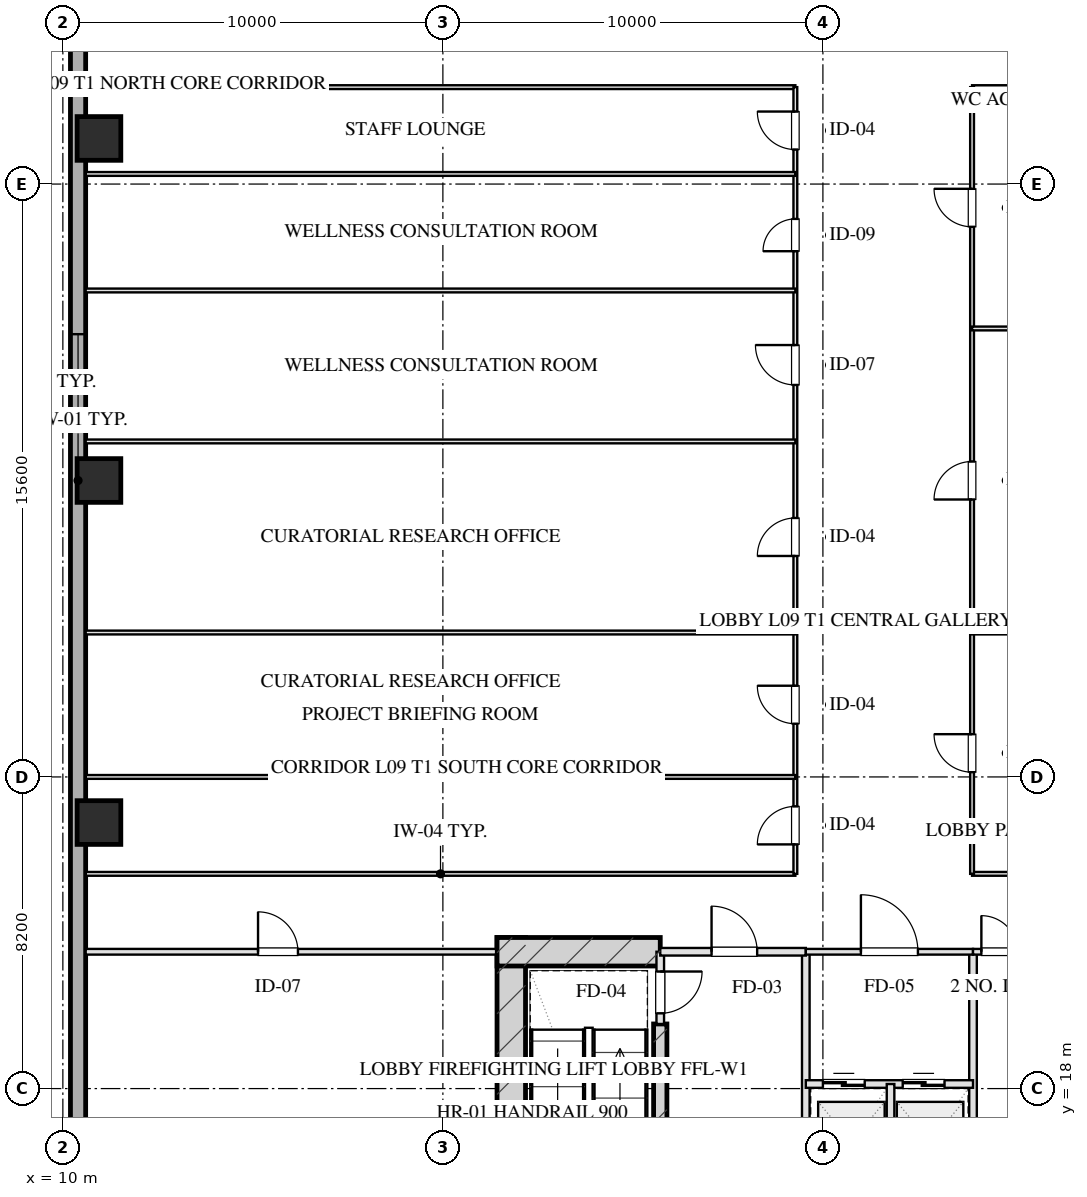
"""IFC4 building model, lengths in metres.
Left out: names, types, materials, properties, quantities, classifications, styles, units other than length and angle.
Written with IfcOpenShell. Run it as: python <this file> out.ifc"""

import sys

from ifc_helpers import new_model, si_unit, direction, frame, frame_2d, origin, origin_2d, place, context, subcontext, project, spatial, rectangle, hollow_rectangle, extrude, element, fill, save


model = new_model("IFC4")
c1 = context("Model", 3, precision=1e-05, world=origin(), true_north=direction((0.0, 1.0)))
c2 = subcontext(c1, "Body", "Model", "MODEL_VIEW")
j1 = project(units=[si_unit("LENGTHUNIT", "METRE"), si_unit("PLANEANGLEUNIT", "RADIAN")], contexts=[c1])
p1 = place(None, origin())
s1 = spatial("IfcSite", under=j1, at=p1, CompositionType="ELEMENT")
p2 = place(p1, origin())
s2 = spatial("IfcBuilding", under=s1, at=p2, CompositionType="ELEMENT")
p3 = place(p2, frame((0.0, 0.0, 42.0)))
s3 = spatial("IfcBuildingStorey", under=s2, at=p3, CompositionType="ELEMENT", Elevation=42.0)
p4 = place(p3, frame((21.8, 21.975, 0.0), z_axis=(0.0, 0.0, 1.0), x_axis=(0.0, -1.0, 0.0)))
e1 = element("IfcWall", 1, at=p4, inside=s3, PredefinedType="SHEAR", context=c2, shape_type="SweptSolid", body=[
    extrude(rectangle(XDim=9.63, YDim=0.75, at=frame_2d((4.815, 0.0))), origin(), (0.0, 0.0, 1.0), 4.0),
])
p5 = place(p3, frame((25.72, 19.7, 0.0), z_axis=(0.0, 0.0, 1.0), x_axis=(0.0, -1.0, 0.0)))
e2 = element("IfcWall", 2, at=p5, inside=s3, PredefinedType="SHEAR", context=c2, shape_type="SweptSolid", body=[
    extrude(rectangle(XDim=6.98, YDim=0.35, at=frame_2d((3.49, 0.0))), origin(), (0.0, 0.0, 1.0), 4.0),
])
p6 = place(p3, frame((21.425, 21.6, 0.0), z_axis=(0.0, 0.0, 1.0), x_axis=(1.0, 0.0, 0.0)))
e3 = element("IfcWall", 3, at=p6, inside=s3, PredefinedType="SHEAR", context=c2, shape_type="SweptSolid", body=[
    extrude(rectangle(XDim=4.295, YDim=0.75, at=frame_2d((2.147, 0.0))), origin(), (0.0, 0.0, 1.0), 4.0),
])
for number, where, z_axis, x_axis in (
    (4, (10.95, 25.0, 0.0), (0.0, 0.0, 1.0), (1.0, 0.0, 0.0)),
    (5, (10.95, 34.0, 0.0), (0.0, 0.0, 1.0), (1.0, 0.0, 0.0)),
    (6, (10.95, 43.0, 0.0), (0.0, 0.0, 1.0), (1.0, 0.0, 0.0)),
):
    element("IfcColumn", number, at=place(p3, frame(where, z_axis=z_axis, x_axis=x_axis)), inside=s3, PredefinedType="COLUMN", context=c2, shape_type="SweptSolid", body=[
        extrude(hollow_rectangle(XDim=1.15, YDim=1.15, WallThickness=0.04, at=origin_2d()), origin(), (0.0, 0.0, 1.0), 4.001),
    ])
p7 = place(p3, frame((10.4, 7.2, 0.0), z_axis=(0.0, 0.0, 1.0), x_axis=(0.0, 1.0, 0.0)))
e7 = element("IfcWall", 7, at=p7, inside=s3, PredefinedType="SOLIDWALL", context=c2, shape_type="SweptSolid", body=[
    extrude(rectangle(XDim=53.6, YDim=0.4, at=frame_2d((26.8, 0.0))), origin(), (0.0, 0.0, 1.0), 3.1),
])
p8 = place(p7, frame((28.15, 0.0, 0.75)))
e8 = element("IfcOpeningElement", 8, at=p8, cuts=e7, PredefinedType="OPENING", context=c2, shape_type="SweptSolid", body=[
    extrude(rectangle(XDim=2.5, YDim=1.75, at=frame_2d((1.25, 0.875))), frame((0.0, 0.21, 0.0), z_axis=(0.0, -1.0, 0.0), x_axis=(1.0, 0.0, 0.0)), (0.0, 0.0, 1.0), 0.42),
])
p9 = place(p3, frame((25.72, 21.6, 0.0), z_axis=(0.0, 0.0, 1.0), x_axis=(0.0, -1.0, 0.0)))
e9 = element("IfcWall", 9, at=p9, inside=s3, PredefinedType="PARTITIONING", context=c2, shape_type="SweptSolid", body=[
    extrude(rectangle(XDim=1.9, YDim=0.2, at=frame_2d((0.95, 0.0))), origin(), (0.0, 0.0, 1.0), 3.705),
])
p10 = place(p9, frame((0.52, 0.0, 0.0)))
e10 = element("IfcOpeningElement", 10, at=p10, cuts=e9, PredefinedType="OPENING", context=c2, shape_type="SweptSolid", body=[
    extrude(rectangle(XDim=1.1, YDim=2.05, at=frame_2d((0.55, 1.025))), frame((0.0, 0.11, 0.0), z_axis=(0.0, -1.0, 0.0), x_axis=(1.0, 0.0, 0.0)), (0.0, 0.0, 1.0), 0.22),
])
p11 = place(p3, frame((29.55, 21.6, 0.0), z_axis=(0.0, 0.0, 1.0), x_axis=(0.0, -1.0, 0.0)))
e11 = element("IfcWall", 11, at=p11, inside=s3, PredefinedType="PARTITIONING", context=c2, shape_type="SweptSolid", body=[
    extrude(rectangle(XDim=8.43, YDim=0.2, at=frame_2d((4.215, 0.0))), origin(), (0.0, 0.0, 1.0), 3.705),
])
p12 = place(p3, frame((25.72, 21.6, 0.0), z_axis=(0.0, 0.0, 1.0), x_axis=(1.0, 0.0, 0.0)))
e12 = element("IfcWall", 12, at=p12, inside=s3, PredefinedType="PARTITIONING", context=c2, shape_type="SweptSolid", body=[
    extrude(rectangle(XDim=3.83, YDim=0.2, at=frame_2d((1.915, 0.0))), origin(), (0.0, 0.0, 1.0), 3.705),
])
p13 = place(p12, frame((1.35, 0.0, 0.0)))
e13 = element("IfcOpeningElement", 13, at=p13, cuts=e12, PredefinedType="OPENING", context=c2, shape_type="SweptSolid", body=[
    extrude(rectangle(XDim=1.2, YDim=2.05, at=frame_2d((0.6, 1.025))), frame((0.0, 0.11, 0.0), z_axis=(0.0, -1.0, 0.0), x_axis=(1.0, 0.0, 0.0)), (0.0, 0.0, 1.0), 0.22),
])
p14 = place(p3, frame((33.95, 21.6, 0.0), z_axis=(0.0, 0.0, 1.0), x_axis=(0.0, -1.0, 0.0)))
e14 = element("IfcWall", 14, at=p14, inside=s3, PredefinedType="PARTITIONING", context=c2, shape_type="SweptSolid", body=[
    extrude(rectangle(XDim=8.43, YDim=0.2, at=frame_2d((4.215, 0.0))), origin(), (0.0, 0.0, 1.0), 3.705),
])
p15 = place(p3, frame((29.55, 21.6, 0.0), z_axis=(0.0, 0.0, 1.0), x_axis=(1.0, 0.0, 0.0)))
e15 = element("IfcWall", 15, at=p15, inside=s3, PredefinedType="PARTITIONING", context=c2, shape_type="SweptSolid", body=[
    extrude(rectangle(XDim=4.4, YDim=0.15, at=frame_2d((2.2, 0.0))), origin(), (0.0, 0.0, 1.0), 3.705),
])
p16 = place(p15, frame((1.45, 0.0, 0.0)))
e16 = element("IfcOpeningElement", 16, at=p16, cuts=e15, PredefinedType="OPENING", context=c2, shape_type="SweptSolid", body=[
    extrude(rectangle(XDim=1.5, YDim=2.05, at=frame_2d((0.75, 1.025))), frame((0.0, 0.085, 0.0), z_axis=(0.0, -1.0, 0.0), x_axis=(1.0, 0.0, 0.0)), (0.0, 0.0, 1.0), 0.17),
])
p17 = place(p3, frame((29.55, 18.12, 0.0), z_axis=(0.0, 0.0, 1.0), x_axis=(1.0, 0.0, 0.0)))
e17 = element("IfcWall", 17, at=p17, inside=s3, PredefinedType="PARTITIONING", context=c2, shape_type="SweptSolid", body=[
    extrude(rectangle(XDim=4.4, YDim=0.2, at=frame_2d((2.2, 0.0))), origin(), (0.0, 0.0, 1.0), 3.705),
])
p18 = place(p17, frame((0.45, 0.0, 0.0)))
e18 = element("IfcOpeningElement", 18, at=p18, cuts=e17, PredefinedType="OPENING", context=c2, shape_type="SweptSolid", body=[
    extrude(rectangle(XDim=1.1, YDim=2.05, at=frame_2d((0.55, 1.025))), frame((0.0, 0.11, 0.0), z_axis=(0.0, -1.0, 0.0), x_axis=(1.0, 0.0, 0.0)), (0.0, 0.0, 1.0), 0.22),
])
p19 = place(p17, frame((2.55, 0.0, 0.0)))
e19 = element("IfcOpeningElement", 19, at=p19, cuts=e17, PredefinedType="OPENING", context=c2, shape_type="SweptSolid", body=[
    extrude(rectangle(XDim=1.1, YDim=2.05, at=frame_2d((0.55, 1.025))), frame((0.0, 0.11, 0.0), z_axis=(0.0, -1.0, 0.0), x_axis=(1.0, 0.0, 0.0)), (0.0, 0.0, 1.0), 0.22),
])
p20 = place(p3, frame((31.78, 18.12, 0.0), z_axis=(0.0, 0.0, 1.0), x_axis=(0.0, -1.0, 0.0)))
e20 = element("IfcWall", 20, at=p20, inside=s3, PredefinedType="PARTITIONING", context=c2, shape_type="SweptSolid", body=[
    extrude(rectangle(XDim=4.95, YDim=0.2, at=frame_2d((2.475, 0.0))), origin(), (0.0, 0.0, 1.0), 3.705),
])
p21 = place(p3, frame((33.95, 21.6, 0.0), z_axis=(0.0, 0.0, 1.0), x_axis=(1.0, 0.0, 0.0)))
e21 = element("IfcWall", 21, at=p21, inside=s3, PredefinedType="PARTITIONING", context=c2, shape_type="SweptSolid", body=[
    extrude(rectangle(XDim=3.8, YDim=0.15, at=frame_2d((1.9, 0.0))), origin(), (0.0, 0.0, 1.0), 3.705),
])
p22 = place(p21, frame((0.22, 0.0, 0.0)))
e22 = element("IfcOpeningElement", 22, at=p22, cuts=e21, PredefinedType="OPENING", context=c2, shape_type="SweptSolid", body=[
    extrude(rectangle(XDim=0.95, YDim=2.05, at=frame_2d((0.475, 1.025))), frame((0.0, 0.085, 0.0), z_axis=(0.0, -1.0, 0.0), x_axis=(1.0, 0.0, 0.0)), (0.0, 0.0, 1.0), 0.17),
])
p23 = place(p21, frame((1.95, 0.0, 0.0)))
e23 = element("IfcOpeningElement", 23, at=p23, cuts=e21, PredefinedType="OPENING", context=c2, shape_type="SweptSolid", body=[
    extrude(rectangle(XDim=0.9, YDim=2.05, at=frame_2d((0.45, 1.025))), frame((0.0, 0.085, 0.0), z_axis=(0.0, -1.0, 0.0), x_axis=(1.0, 0.0, 0.0)), (0.0, 0.0, 1.0), 0.17),
])
p24 = place(p3, frame((10.6, 21.6, 0.0), z_axis=(0.0, 0.0, 1.0), x_axis=(1.0, 0.0, 0.0)))
e24 = element("IfcWall", 24, at=p24, inside=s3, PredefinedType="PARTITIONING", context=c2, shape_type="SweptSolid", body=[
    extrude(rectangle(XDim=10.8, YDim=0.15, at=frame_2d((5.4, 0.0))), origin(), (0.0, 0.0, 1.0), 3.705),
])
p25 = place(p24, frame((4.536, 0.0, 0.0)))
e25 = element("IfcOpeningElement", 25, at=p25, cuts=e24, PredefinedType="OPENING", context=c2, shape_type="SweptSolid", body=[
    extrude(rectangle(XDim=1.05, YDim=2.05, at=frame_2d((0.525, 1.025))), frame((0.0, 0.085, 0.0), z_axis=(0.0, -1.0, 0.0), x_axis=(1.0, 0.0, 0.0)), (0.0, 0.0, 1.0), 0.17),
])
p26 = place(p3, frame((10.6, 23.65, 0.0), z_axis=(0.0, 0.0, 1.0), x_axis=(1.0, 0.0, 0.0)))
e26 = element("IfcWall", 26, at=p26, inside=s3, PredefinedType="MOVABLE", context=c2, shape_type="SweptSolid", body=[
    extrude(rectangle(XDim=18.675, YDim=0.1, at=frame_2d((9.337, 0.0))), origin(), (0.0, 0.0, 1.0), 3.705),
])
p27 = place(p3, frame((33.925, 23.65, 0.0), z_axis=(0.0, 0.0, 1.0), x_axis=(1.0, 0.0, 0.0)))
e27 = element("IfcWall", 27, at=p27, inside=s3, PredefinedType="MOVABLE", context=c2, shape_type="SweptSolid", body=[
    extrude(rectangle(XDim=15.475, YDim=0.1, at=frame_2d((7.737, 0.0))), origin(), (0.0, 0.0, 1.0), 3.705),
])
p28 = place(p3, frame((10.6, 44.35, 0.0), z_axis=(0.0, 0.0, 1.0), x_axis=(1.0, 0.0, 0.0)))
e28 = element("IfcWall", 28, at=p28, inside=s3, PredefinedType="MOVABLE", context=c2, shape_type="SweptSolid", body=[
    extrude(rectangle(XDim=18.675, YDim=0.1, at=frame_2d((9.337, 0.0))), origin(), (0.0, 0.0, 1.0), 3.705),
])
p29 = place(p3, frame((33.925, 44.35, 0.0), z_axis=(0.0, 0.0, 1.0), x_axis=(1.0, 0.0, 0.0)))
e29 = element("IfcWall", 29, at=p29, inside=s3, PredefinedType="MOVABLE", context=c2, shape_type="SweptSolid", body=[
    extrude(rectangle(XDim=15.475, YDim=0.1, at=frame_2d((7.737, 0.0))), origin(), (0.0, 0.0, 1.0), 3.705),
])
p30 = place(p3, frame((29.275, 23.65, 0.0), z_axis=(0.0, 0.0, 1.0), x_axis=(0.0, 1.0, 0.0)))
e30 = element("IfcWall", 30, at=p30, inside=s3, PredefinedType="MOVABLE", context=c2, shape_type="SweptSolid", body=[
    extrude(rectangle(XDim=20.7, YDim=0.1, at=frame_2d((10.35, 0.0))), origin(), (0.0, 0.0, 1.0), 3.705),
])
p31 = place(p30, frame((0.775, 0.0, 0.0)))
e31 = element("IfcOpeningElement", 31, at=p31, cuts=e30, PredefinedType="OPENING", context=c2, shape_type="SweptSolid", body=[
    extrude(rectangle(XDim=1.0, YDim=2.05, at=frame_2d((0.5, 1.025))), frame((0.0, 0.06, 0.0), z_axis=(0.0, -1.0, 0.0), x_axis=(1.0, 0.0, 0.0)), (0.0, 0.0, 1.0), 0.12),
])
p32 = place(p30, frame((3.95, 0.0, 0.0)))
e32 = element("IfcOpeningElement", 32, at=p32, cuts=e30, PredefinedType="OPENING", context=c2, shape_type="SweptSolid", body=[
    extrude(rectangle(XDim=1.0, YDim=2.05, at=frame_2d((0.5, 1.025))), frame((0.0, 0.06, 0.0), z_axis=(0.0, -1.0, 0.0), x_axis=(1.0, 0.0, 0.0)), (0.0, 0.0, 1.0), 0.12),
])
p33 = place(p30, frame((8.364, 0.0, 0.0)))
e33 = element("IfcOpeningElement", 33, at=p33, cuts=e30, PredefinedType="OPENING", context=c2, shape_type="SweptSolid", body=[
    extrude(rectangle(XDim=1.0, YDim=2.05, at=frame_2d((0.5, 1.025))), frame((0.0, 0.06, 0.0), z_axis=(0.0, -1.0, 0.0), x_axis=(1.0, 0.0, 0.0)), (0.0, 0.0, 1.0), 0.12),
])
p34 = place(p30, frame((12.864, 0.0, 0.0)))
e34 = element("IfcOpeningElement", 34, at=p34, cuts=e30, PredefinedType="OPENING", context=c2, shape_type="SweptSolid", body=[
    extrude(rectangle(XDim=1.05, YDim=2.05, at=frame_2d((0.525, 1.025))), frame((0.0, 0.06, 0.0), z_axis=(0.0, -1.0, 0.0), x_axis=(1.0, 0.0, 0.0)), (0.0, 0.0, 1.0), 0.12),
])
p35 = place(p30, frame((16.383, 0.0, 0.0)))
e35 = element("IfcOpeningElement", 35, at=p35, cuts=e30, PredefinedType="OPENING", context=c2, shape_type="SweptSolid", body=[
    extrude(rectangle(XDim=0.85, YDim=2.05, at=frame_2d((0.425, 1.025))), frame((0.0, 0.06, 0.0), z_axis=(0.0, -1.0, 0.0), x_axis=(1.0, 0.0, 0.0)), (0.0, 0.0, 1.0), 0.12),
])
p36 = place(p30, frame((19.058, 0.0, 0.0)))
e36 = element("IfcOpeningElement", 36, at=p36, cuts=e30, PredefinedType="OPENING", context=c2, shape_type="SweptSolid", body=[
    extrude(rectangle(XDim=1.0, YDim=2.05, at=frame_2d((0.5, 1.025))), frame((0.0, 0.06, 0.0), z_axis=(0.0, -1.0, 0.0), x_axis=(1.0, 0.0, 0.0)), (0.0, 0.0, 1.0), 0.12),
])
p37 = place(p3, frame((33.925, 23.65, 0.0), z_axis=(0.0, 0.0, 1.0), x_axis=(0.0, 1.0, 0.0)))
e37 = element("IfcWall", 37, at=p37, inside=s3, PredefinedType="MOVABLE", context=c2, shape_type="SweptSolid", body=[
    extrude(rectangle(XDim=20.7, YDim=0.1, at=frame_2d((10.35, 0.0))), origin(), (0.0, 0.0, 1.0), 3.705),
])
p38 = place(p37, frame((2.675, 0.0, 0.0)))
e38 = element("IfcOpeningElement", 38, at=p38, cuts=e37, PredefinedType="OPENING", context=c2, shape_type="SweptSolid", body=[
    extrude(rectangle(XDim=1.0, YDim=2.05, at=frame_2d((0.5, 1.025))), frame((0.0, 0.06, 0.0), z_axis=(0.0, -1.0, 0.0), x_axis=(1.0, 0.0, 0.0)), (0.0, 0.0, 1.0), 0.12),
])
p39 = place(p37, frame((9.85, 0.0, 0.0)))
e39 = element("IfcOpeningElement", 39, at=p39, cuts=e37, PredefinedType="OPENING", context=c2, shape_type="SweptSolid", body=[
    extrude(rectangle(XDim=1.0, YDim=2.05, at=frame_2d((0.5, 1.025))), frame((0.0, 0.06, 0.0), z_axis=(0.0, -1.0, 0.0), x_axis=(1.0, 0.0, 0.0)), (0.0, 0.0, 1.0), 0.12),
])
p40 = place(p37, frame((17.025, 0.0, 0.0)))
e40 = element("IfcOpeningElement", 40, at=p40, cuts=e37, PredefinedType="OPENING", context=c2, shape_type="SweptSolid", body=[
    extrude(rectangle(XDim=1.0, YDim=2.05, at=frame_2d((0.5, 1.025))), frame((0.0, 0.06, 0.0), z_axis=(0.0, -1.0, 0.0), x_axis=(1.0, 0.0, 0.0)), (0.0, 0.0, 1.0), 0.12),
])
for number, where, z_axis, x_axis in (
    (41, (10.6, 26.2, 0.0), (0.0, 0.0, 1.0), (1.0, 0.0, 0.0)),
    (42, (10.6, 30.0, 0.0), (0.0, 0.0, 1.0), (1.0, 0.0, 0.0)),
    (43, (10.6, 35.028, 0.0), (0.0, 0.0, 1.0), (1.0, 0.0, 0.0)),
    (44, (10.6, 39.0, 0.0), (0.0, 0.0, 1.0), (1.0, 0.0, 0.0)),
    (45, (10.6, 42.066, 0.0), (0.0, 0.0, 1.0), (1.0, 0.0, 0.0)),
):
    element("IfcWall", number, at=place(p3, frame(where, z_axis=z_axis, x_axis=x_axis)), inside=s3, PredefinedType="MOVABLE", context=c2, shape_type="SweptSolid", body=[
        extrude(rectangle(XDim=18.675, YDim=0.1, at=frame_2d((9.337, 0.0))), origin(), (0.0, 0.0, 1.0), 3.705),
    ])
for number, where, z_axis, x_axis in (
    (46, (33.925, 30.0, 0.0), (0.0, 0.0, 1.0), (1.0, 0.0, 0.0)),
    (47, (33.925, 38.0, 0.0), (0.0, 0.0, 1.0), (1.0, 0.0, 0.0)),
):
    element("IfcWall", number, at=place(p3, frame(where, z_axis=z_axis, x_axis=x_axis)), inside=s3, PredefinedType="MOVABLE", context=c2, shape_type="SweptSolid", body=[
        extrude(rectangle(XDim=15.475, YDim=0.1, at=frame_2d((7.737, 0.0))), origin(), (0.0, 0.0, 1.0), 3.705),
    ])
p41 = place(p8, origin())
e48 = element("IfcWindow", 48, at=p41, inside=s3, PartitioningType="TRIPLE_PANEL_VERTICAL", PredefinedType="WINDOW", context=c2, shape_type="SweptSolid", body=[
    extrude(rectangle(XDim=2.5, YDim=1.75, at=frame_2d((1.25, 0.875))), frame((0.0, 0.03, 0.0), z_axis=(0.0, -1.0, 0.0), x_axis=(1.0, 0.0, 0.0)), (0.0, 0.0, 1.0), 0.06),
])
fill(e8, e48)
p42 = place(p10, origin())
e49 = element("IfcDoor", 49, at=p42, inside=s3, OperationType="SINGLE_SWING_LEFT", PredefinedType="DOOR", context=c2, shape_type="SweptSolid", body=[
    extrude(rectangle(XDim=1.1, YDim=2.05, at=frame_2d((0.55, 1.025))), frame((0.0, 0.025, 0.0), z_axis=(0.0, -1.0, 0.0), x_axis=(1.0, 0.0, 0.0)), (0.0, 0.0, 1.0), 0.05),
])
fill(e10, e49)
p43 = place(p13, origin())
e50 = element("IfcDoor", 50, at=p43, inside=s3, OperationType="SINGLE_SWING_LEFT", PredefinedType="DOOR", context=c2, shape_type="SweptSolid", body=[
    extrude(rectangle(XDim=1.2, YDim=2.05, at=frame_2d((0.6, 1.025))), frame((0.0, 0.025, 0.0), z_axis=(0.0, -1.0, 0.0), x_axis=(1.0, 0.0, 0.0)), (0.0, 0.0, 1.0), 0.05),
])
fill(e13, e50)
p44 = place(p16, origin())
e51 = element("IfcDoor", 51, at=p44, inside=s3, OperationType="SINGLE_SWING_LEFT", PredefinedType="DOOR", context=c2, shape_type="SweptSolid", body=[
    extrude(rectangle(XDim=1.5, YDim=2.05, at=frame_2d((0.75, 1.025))), frame((0.0, 0.025, 0.0), z_axis=(0.0, -1.0, 0.0), x_axis=(1.0, 0.0, 0.0)), (0.0, 0.0, 1.0), 0.05),
])
fill(e16, e51)
p45 = place(p18, origin())
e52 = element("IfcDoor", 52, at=p45, inside=s3, OperationType="DOUBLE_DOOR_SLIDING", PredefinedType="DOOR", context=c2, shape_type="SweptSolid", body=[
    extrude(rectangle(XDim=1.1, YDim=2.05, at=frame_2d((0.55, 1.025))), frame((0.0, 0.025, 0.0), z_axis=(0.0, -1.0, 0.0), x_axis=(1.0, 0.0, 0.0)), (0.0, 0.0, 1.0), 0.05),
])
fill(e18, e52)
p46 = place(p19, origin())
e53 = element("IfcDoor", 53, at=p46, inside=s3, OperationType="DOUBLE_DOOR_SLIDING", PredefinedType="DOOR", context=c2, shape_type="SweptSolid", body=[
    extrude(rectangle(XDim=1.1, YDim=2.05, at=frame_2d((0.55, 1.025))), frame((0.0, 0.025, 0.0), z_axis=(0.0, -1.0, 0.0), x_axis=(1.0, 0.0, 0.0)), (0.0, 0.0, 1.0), 0.05),
])
fill(e19, e53)
p47 = place(p22, origin())
e54 = element("IfcDoor", 54, at=p47, inside=s3, OperationType="SINGLE_SWING_LEFT", PredefinedType="DOOR", context=c2, shape_type="SweptSolid", body=[
    extrude(rectangle(XDim=0.95, YDim=2.05, at=frame_2d((0.475, 1.025))), frame((0.0, 0.025, 0.0), z_axis=(0.0, -1.0, 0.0), x_axis=(1.0, 0.0, 0.0)), (0.0, 0.0, 1.0), 0.05),
])
fill(e22, e54)
p48 = place(p25, origin())
e55 = element("IfcDoor", 55, at=p48, inside=s3, OperationType="SINGLE_SWING_LEFT", PredefinedType="DOOR", context=c2, shape_type="SweptSolid", body=[
    extrude(rectangle(XDim=1.05, YDim=2.05, at=frame_2d((0.525, 1.025))), frame((0.0, 0.025, 0.0), z_axis=(0.0, -1.0, 0.0), x_axis=(1.0, 0.0, 0.0)), (0.0, 0.0, 1.0), 0.05),
])
fill(e25, e55)
p49 = place(p31, origin())
e56 = element("IfcDoor", 56, at=p49, inside=s3, OperationType="SINGLE_SWING_LEFT", PredefinedType="DOOR", context=c2, shape_type="SweptSolid", body=[
    extrude(rectangle(XDim=1.0, YDim=2.05, at=frame_2d((0.5, 1.025))), frame((0.0, 0.025, 0.0), z_axis=(0.0, -1.0, 0.0), x_axis=(1.0, 0.0, 0.0)), (0.0, 0.0, 1.0), 0.05),
])
fill(e31, e56)
p50 = place(p32, origin())
e57 = element("IfcDoor", 57, at=p50, inside=s3, OperationType="SINGLE_SWING_RIGHT", PredefinedType="DOOR", context=c2, shape_type="SweptSolid", body=[
    extrude(rectangle(XDim=1.0, YDim=2.05, at=frame_2d((0.5, 1.025))), frame((0.0, 0.025, 0.0), z_axis=(0.0, -1.0, 0.0), x_axis=(1.0, 0.0, 0.0)), (0.0, 0.0, 1.0), 0.05),
])
fill(e32, e57)
p51 = place(p33, origin())
e58 = element("IfcDoor", 58, at=p51, inside=s3, OperationType="SINGLE_SWING_LEFT", PredefinedType="DOOR", context=c2, shape_type="SweptSolid", body=[
    extrude(rectangle(XDim=1.0, YDim=2.05, at=frame_2d((0.5, 1.025))), frame((0.0, 0.025, 0.0), z_axis=(0.0, -1.0, 0.0), x_axis=(1.0, 0.0, 0.0)), (0.0, 0.0, 1.0), 0.05),
])
fill(e33, e58)
p52 = place(p34, origin())
e59 = element("IfcDoor", 59, at=p52, inside=s3, OperationType="SINGLE_SWING_RIGHT", PredefinedType="DOOR", context=c2, shape_type="SweptSolid", body=[
    extrude(rectangle(XDim=1.05, YDim=2.05, at=frame_2d((0.525, 1.025))), frame((0.0, 0.025, 0.0), z_axis=(0.0, -1.0, 0.0), x_axis=(1.0, 0.0, 0.0)), (0.0, 0.0, 1.0), 0.05),
])
fill(e34, e59)
p53 = place(p35, origin())
e60 = element("IfcDoor", 60, at=p53, inside=s3, OperationType="SINGLE_SWING_LEFT", PredefinedType="DOOR", context=c2, shape_type="SweptSolid", body=[
    extrude(rectangle(XDim=0.85, YDim=2.05, at=frame_2d((0.425, 1.025))), frame((0.0, 0.025, 0.0), z_axis=(0.0, -1.0, 0.0), x_axis=(1.0, 0.0, 0.0)), (0.0, 0.0, 1.0), 0.05),
])
fill(e35, e60)
p54 = place(p36, origin())
e61 = element("IfcDoor", 61, at=p54, inside=s3, OperationType="SINGLE_SWING_RIGHT", PredefinedType="DOOR", context=c2, shape_type="SweptSolid", body=[
    extrude(rectangle(XDim=1.0, YDim=2.05, at=frame_2d((0.5, 1.025))), frame((0.0, 0.025, 0.0), z_axis=(0.0, -1.0, 0.0), x_axis=(1.0, 0.0, 0.0)), (0.0, 0.0, 1.0), 0.05),
])
fill(e36, e61)
p55 = place(p38, origin())
e62 = element("IfcDoor", 62, at=p55, inside=s3, OperationType="SINGLE_SWING_RIGHT", PredefinedType="DOOR", context=c2, shape_type="SweptSolid", body=[
    extrude(rectangle(XDim=1.0, YDim=2.05, at=frame_2d((0.5, 1.025))), frame((0.0, 0.025, 0.0), z_axis=(0.0, -1.0, 0.0), x_axis=(1.0, 0.0, 0.0)), (0.0, 0.0, 1.0), 0.05),
])
fill(e38, e62)
p56 = place(p39, origin())
e63 = element("IfcDoor", 63, at=p56, inside=s3, OperationType="SINGLE_SWING_LEFT", PredefinedType="DOOR", context=c2, shape_type="SweptSolid", body=[
    extrude(rectangle(XDim=1.0, YDim=2.05, at=frame_2d((0.5, 1.025))), frame((0.0, 0.025, 0.0), z_axis=(0.0, -1.0, 0.0), x_axis=(1.0, 0.0, 0.0)), (0.0, 0.0, 1.0), 0.05),
])
fill(e39, e63)
p57 = place(p40, origin())
e64 = element("IfcDoor", 64, at=p57, inside=s3, OperationType="SINGLE_SWING_RIGHT", PredefinedType="DOOR", context=c2, shape_type="SweptSolid", body=[
    extrude(rectangle(XDim=1.0, YDim=2.05, at=frame_2d((0.5, 1.025))), frame((0.0, 0.025, 0.0), z_axis=(0.0, -1.0, 0.0), x_axis=(1.0, 0.0, 0.0)), (0.0, 0.0, 1.0), 0.05),
])
fill(e40, e64)
save(model, sys.argv[1])
